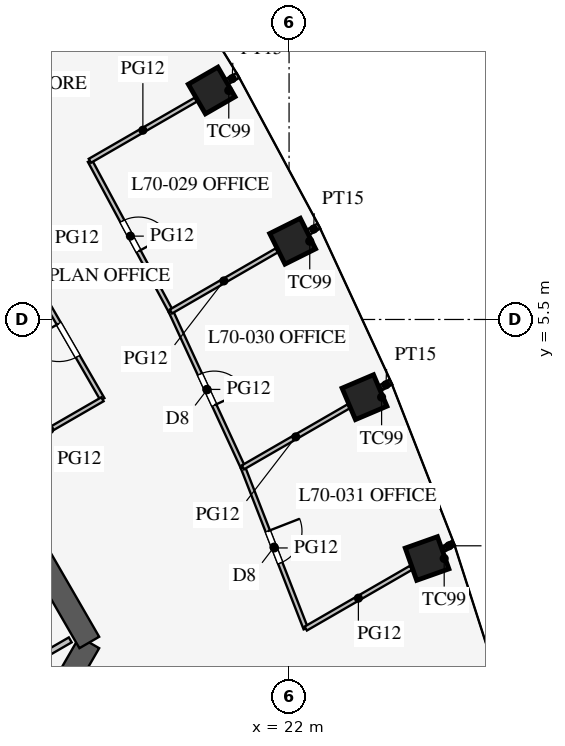
"""IFC4 building model, lengths in metres.
Left out: names, types, materials, properties, quantities, classifications, styles, units other than length and angle.
Written with IfcOpenShell. Run it as: python <this file> out.ifc"""

import sys

from ifc_helpers import new_model, si_unit, direction, frame, frame_2d, origin, origin_2d, place, context, subcontext, project, spatial, rectangle, extrude, element, fill, save


model = new_model("IFC4")
c1 = context("Model", 3, precision=1e-05, world=origin(), true_north=direction((0.0, 1.0)))
c2 = subcontext(c1, "Body", "Model", "MODEL_VIEW")
j1 = project(units=[si_unit("LENGTHUNIT", "METRE"), si_unit("PLANEANGLEUNIT", "RADIAN")], contexts=[c1])
p1 = place(None, origin())
s1 = spatial("IfcSite", under=j1, at=p1, CompositionType="ELEMENT")
p2 = place(p1, origin())
s2 = spatial("IfcBuilding", under=s1, at=p2, CompositionType="ELEMENT")
p3 = place(p2, frame((0.0, 0.0, 305.7)))
s3 = spatial("IfcBuildingStorey", under=s2, at=p3, CompositionType="ELEMENT", Elevation=305.7)
for number, where, z_axis, x_axis in (
    (1, (25.632, -0.79, 0.0), (0.0, 0.0, 1.0), (-0.334, 0.942, 0.0)),
    (2, (23.985, 3.455, 0.0), (0.0, 0.0, 1.0), (-0.391, 0.92, 0.0)),
    (3, (22.094, 7.56, 0.0), (0.0, 0.0, 1.0), (-0.447, 0.895, 0.0)),
    (4, (19.963, 11.526, 0.0), (0.0, 0.0, 1.0), (-0.5, 0.866, 0.0)),
):
    element("IfcColumn", number, at=place(p3, frame(where, z_axis=z_axis, x_axis=x_axis)), inside=s3, PredefinedType="COLUMN", context=c2, shape_type="SweptSolid", body=[
        extrude(rectangle(XDim=0.9, YDim=0.9, at=origin_2d()), origin(), (0.0, 0.0, 1.0), 4.2),
    ])
p4 = place(p3, frame((10.97, -13.0, 0.0), z_axis=(0.0, 0.0, 1.0), x_axis=(0.499995765644, 0.866027848477, 0.0)))
e5 = element("IfcWall", 5, at=p4, inside=s3, PredefinedType="SHEAR", context=c2, shape_type="SweptSolid", body=[
    extrude(rectangle(XDim=11.547, YDim=0.6, at=frame_2d((5.773, 0.0))), origin(), (0.0, 0.0, 1.0), 4.2),
])
p5 = place(p3, frame((16.743, -3.0, 0.0), z_axis=(0.0, 0.0, 1.0), x_axis=(-0.500002442456, 0.866023993627, 0.0)))
e6 = element("IfcWall", 6, at=p5, inside=s3, PredefinedType="SHEAR", context=c2, shape_type="SweptSolid", body=[
    extrude(rectangle(XDim=21.939, YDim=0.6, at=frame_2d((10.97, 0.0))), origin(), (0.0, 0.0, 1.0), 4.2),
])
p6 = place(p5, frame((17.27, 0.0, 0.0)))
e7 = element("IfcOpeningElement", 7, at=p6, cuts=e6, PredefinedType="OPENING", context=c2, shape_type="SweptSolid", body=[
    extrude(rectangle(XDim=1.2, YDim=2.1, at=frame_2d((0.6, 1.05))), frame((0.0, 0.31, 0.0), z_axis=(0.0, -1.0, 0.0), x_axis=(1.0, 0.0, 0.0)), (0.0, 0.0, 1.0), 0.62),
])
p7 = place(p5, frame((3.47, 0.0, 0.0)))
e8 = element("IfcOpeningElement", 8, at=p7, cuts=e6, PredefinedType="OPENING", context=c2, shape_type="SweptSolid", body=[
    extrude(rectangle(XDim=1.2, YDim=2.1, at=frame_2d((0.6, 1.05))), frame((0.0, 0.31, 0.0), z_axis=(0.0, -1.0, 0.0), x_axis=(1.0, 0.0, 0.0)), (0.0, 0.0, 1.0), 0.62),
])
p8 = place(p3, frame((12.691, -4.982, 0.0), z_axis=(0.0, 0.0, 1.0), x_axis=(0.8660249478, 0.500000789788, 0.0)))
e9 = element("IfcWall", 9, at=p8, inside=s3, PredefinedType="PARTITIONING", context=c2, shape_type="SweptSolid", body=[
    extrude(rectangle(XDim=4.1, YDim=0.15, at=frame_2d((2.05, 0.0))), origin(), (0.0, 0.0, 1.0), 4.0),
])
p9 = place(p3, frame((17.089, 3.4, 0.0), z_axis=(0.0, 0.0, 1.0), x_axis=(-0.499982693035, 0.866035395735, 0.0)))
e10 = element("IfcWall", 10, at=p9, inside=s3, PredefinedType="PARTITIONING", context=c2, shape_type="SweptSolid", body=[
    extrude(rectangle(XDim=3.6, YDim=0.12, at=frame_2d((1.8, 0.0))), origin(), (0.0, 0.0, 1.0), 2.9),
])
p10 = place(p9, frame((1.3, 0.0, 0.15)))
e11 = element("IfcOpeningElement", 11, at=p10, cuts=e10, PredefinedType="OPENING", context=c2, shape_type="SweptSolid", body=[
    extrude(rectangle(XDim=1.0, YDim=2.1, at=frame_2d((0.5, 1.05))), frame((0.0, 0.07, 0.0), z_axis=(0.0, -1.0, 0.0), x_axis=(1.0, 0.0, 0.0)), (0.0, 0.0, 1.0), 0.14),
])
p11 = place(p3, frame((14.318, 1.8, 0.0), z_axis=(0.0, 0.0, 1.0), x_axis=(0.866042017984, 0.499971222258, 0.0)))
e12 = element("IfcWall", 12, at=p11, inside=s3, PredefinedType="PARTITIONING", context=c2, shape_type="SweptSolid", body=[
    extrude(rectangle(XDim=3.2, YDim=0.12, at=frame_2d((1.6, 0.0))), origin(), (0.0, 0.0, 1.0), 2.9),
])
p12 = place(p3, frame((20.356, 11.753, 0.0), z_axis=(0.0, 0.0, 1.0), x_axis=(0.865899514186, 0.500217983815, 0.0)))
e13 = element("IfcWall", 13, at=p12, inside=s3, PredefinedType="PARTITIONING", context=c2, shape_type="SweptSolid", body=[
    extrude(rectangle(XDim=0.341, YDim=0.15, at=frame_2d((0.17, 0.0))), origin(), (0.0, 0.0, 1.0), 2.9),
])
p13 = place(p3, frame((26.089, -0.526, 0.0), z_axis=(0.0, 0.0, 1.0), x_axis=(0.865982457891, 0.500074377092, 0.0)))
e14 = element("IfcWall", 14, at=p13, inside=s3, PredefinedType="PARTITIONING", context=c2, shape_type="SweptSolid", body=[
    extrude(rectangle(XDim=0.28, YDim=0.15, at=frame_2d((0.14, 0.0))), origin(), (0.0, 0.0, 1.0), 2.9),
])
p14 = place(p3, frame((22.51, 7.8, 0.0), z_axis=(0.0, 0.0, 1.0), x_axis=(0.866095534226, 0.499878510834, 0.0)))
e15 = element("IfcWall", 15, at=p14, inside=s3, PredefinedType="PARTITIONING", context=c2, shape_type="SweptSolid", body=[
    extrude(rectangle(XDim=0.316, YDim=0.15, at=frame_2d((0.158, 0.0))), origin(), (0.0, 0.0, 1.0), 2.9),
])
p15 = place(p3, frame((24.422, 3.708, 0.0), z_axis=(0.0, 0.0, 1.0), x_axis=(0.866254317358, 0.499603300288, 0.0)))
e16 = element("IfcWall", 16, at=p15, inside=s3, PredefinedType="PARTITIONING", context=c2, shape_type="SweptSolid", body=[
    extrude(rectangle(XDim=0.296, YDim=0.15, at=frame_2d((0.148, 0.0))), origin(), (0.0, 0.0, 1.0), 2.9),
])
p16 = place(p3, frame((22.439, -2.633, 0.0), z_axis=(0.0, 0.0, 1.0), x_axis=(-0.363212149153, 0.931706463811, 0.0)))
e17 = element("IfcWall", 17, at=p16, inside=s3, PredefinedType="PARTITIONING", context=c2, shape_type="SweptSolid", body=[
    extrude(rectangle(XDim=4.553, YDim=0.12, at=frame_2d((2.276, 0.0))), origin(), (0.0, 0.0, 1.0), 2.9),
])
p17 = place(p16, frame((1.85, 0.0, 0.15)))
e18 = element("IfcOpeningElement", 18, at=p17, cuts=e17, PredefinedType="OPENING", context=c2, shape_type="SweptSolid", body=[
    extrude(rectangle(XDim=0.9, YDim=2.1, at=frame_2d((0.45, 1.05))), frame((0.0, 0.07, 0.0), z_axis=(0.0, -1.0, 0.0), x_axis=(1.0, 0.0, 0.0)), (0.0, 0.0, 1.0), 0.14),
])
p18 = place(p3, frame((18.891, 5.71, 0.0), z_axis=(0.0, 0.0, 1.0), x_axis=(-0.473524102582, 0.880780860529, 0.0)))
e19 = element("IfcWall", 19, at=p18, inside=s3, PredefinedType="PARTITIONING", context=c2, shape_type="SweptSolid", body=[
    extrude(rectangle(XDim=4.502, YDim=0.12, at=frame_2d((2.251, 0.0))), origin(), (0.0, 0.0, 1.0), 2.9),
])
p19 = place(p18, frame((1.8, 0.0, 0.15)))
e20 = element("IfcOpeningElement", 20, at=p19, cuts=e19, PredefinedType="OPENING", context=c2, shape_type="SweptSolid", body=[
    extrude(rectangle(XDim=0.9, YDim=2.1, at=frame_2d((0.45, 1.05))), frame((0.0, 0.07, 0.0), z_axis=(0.0, -1.0, 0.0), x_axis=(1.0, 0.0, 0.0)), (0.0, 0.0, 1.0), 0.14),
])
p20 = place(p3, frame((20.786, 1.608, 0.0), z_axis=(0.0, 0.0, 1.0), x_axis=(-0.419335693458, 0.907831248742, 0.0)))
e21 = element("IfcWall", 21, at=p20, inside=s3, PredefinedType="PARTITIONING", context=c2, shape_type="SweptSolid", body=[
    extrude(rectangle(XDim=4.519, YDim=0.12, at=frame_2d((2.259, 0.0))), origin(), (0.0, 0.0, 1.0), 2.9),
])
p21 = place(p20, frame((1.8, 0.0, 0.15)))
e22 = element("IfcOpeningElement", 22, at=p21, cuts=e21, PredefinedType="OPENING", context=c2, shape_type="SweptSolid", body=[
    extrude(rectangle(XDim=0.9, YDim=2.1, at=frame_2d((0.45, 1.05))), frame((0.0, 0.07, 0.0), z_axis=(0.0, -1.0, 0.0), x_axis=(1.0, 0.0, 0.0)), (0.0, 0.0, 1.0), 0.14),
])
p22 = place(p3, frame((16.759, 9.676, 0.0), z_axis=(0.0, 0.0, 1.0), x_axis=(0.866008816382, 0.500028729123, 0.0)))
e23 = element("IfcWall", 23, at=p22, inside=s3, PredefinedType="PARTITIONING", context=c2, shape_type="SweptSolid", body=[
    extrude(rectangle(XDim=3.22, YDim=0.12, at=frame_2d((1.61, 0.0))), origin(), (0.0, 0.0, 1.0), 2.9),
])
p23 = place(p3, frame((22.439, -2.633, 0.0), z_axis=(0.0, 0.0, 1.0), x_axis=(0.866012717091, 0.500021973353, 0.0)))
e24 = element("IfcWall", 24, at=p23, inside=s3, PredefinedType="PARTITIONING", context=c2, shape_type="SweptSolid", body=[
    extrude(rectangle(XDim=3.198, YDim=0.12, at=frame_2d((1.599, 0.0))), origin(), (0.0, 0.0, 1.0), 2.9),
])
p24 = place(p3, frame((18.891, 5.71, 0.0), z_axis=(0.0, 0.0, 1.0), x_axis=(0.866021328928, 0.500007057792, 0.0)))
e25 = element("IfcWall", 25, at=p24, inside=s3, PredefinedType="PARTITIONING", context=c2, shape_type="SweptSolid", body=[
    extrude(rectangle(XDim=3.218, YDim=0.12, at=frame_2d((1.609, 0.0))), origin(), (0.0, 0.0, 1.0), 2.9),
])
p25 = place(p3, frame((20.786, 1.608, 0.0), z_axis=(0.0, 0.0, 1.0), x_axis=(0.866039964284, 0.499974779627, 0.0)))
e26 = element("IfcWall", 26, at=p25, inside=s3, PredefinedType="PARTITIONING", context=c2, shape_type="SweptSolid", body=[
    extrude(rectangle(XDim=3.211, YDim=0.12, at=frame_2d((1.605, 0.0))), origin(), (0.0, 0.0, 1.0), 2.9),
])
p26 = place(p10, origin())
e27 = element("IfcDoor", 27, at=p26, inside=s3, OperationType="SINGLE_SWING_RIGHT", PredefinedType="DOOR", context=c2, shape_type="SweptSolid", body=[
    extrude(rectangle(XDim=1.0, YDim=2.1, at=frame_2d((0.5, 1.05))), frame((0.0, 0.025, 0.0), z_axis=(0.0, -1.0, 0.0), x_axis=(1.0, 0.0, 0.0)), (0.0, 0.0, 1.0), 0.05),
])
fill(e11, e27)
p27 = place(p19, frame((0.9, 0.0, 0.0), z_axis=(0.0, 0.0, 1.0), x_axis=(-1.0, 0.0, 0.0)))
e28 = element("IfcDoor", 28, at=p27, inside=s3, OperationType="SINGLE_SWING_RIGHT", PredefinedType="DOOR", context=c2, shape_type="SweptSolid", body=[
    extrude(rectangle(XDim=0.9, YDim=2.1, at=frame_2d((0.45, 1.05))), frame((0.0, 0.025, 0.0), z_axis=(0.0, -1.0, 0.0), x_axis=(1.0, 0.0, 0.0)), (0.0, 0.0, 1.0), 0.05),
])
fill(e20, e28)
p28 = place(p21, frame((0.9, 0.0, 0.0), z_axis=(0.0, 0.0, 1.0), x_axis=(-1.0, 0.0, 0.0)))
e29 = element("IfcDoor", 29, at=p28, inside=s3, OperationType="SINGLE_SWING_RIGHT", PredefinedType="DOOR", context=c2, shape_type="SweptSolid", body=[
    extrude(rectangle(XDim=0.9, YDim=2.1, at=frame_2d((0.45, 1.05))), frame((0.0, 0.025, 0.0), z_axis=(0.0, -1.0, 0.0), x_axis=(1.0, 0.0, 0.0)), (0.0, 0.0, 1.0), 0.05),
])
fill(e22, e29)
p29 = place(p17, frame((0.9, 0.0, 0.0), z_axis=(0.0, 0.0, 1.0), x_axis=(-1.0, 0.0, 0.0)))
e30 = element("IfcDoor", 30, at=p29, inside=s3, OperationType="SINGLE_SWING_LEFT", PredefinedType="DOOR", context=c2, shape_type="SweptSolid", body=[
    extrude(rectangle(XDim=0.9, YDim=2.1, at=frame_2d((0.45, 1.05))), frame((0.0, 0.025, 0.0), z_axis=(0.0, -1.0, 0.0), x_axis=(1.0, 0.0, 0.0)), (0.0, 0.0, 1.0), 0.05),
])
fill(e18, e30)
save(model, sys.argv[1])
